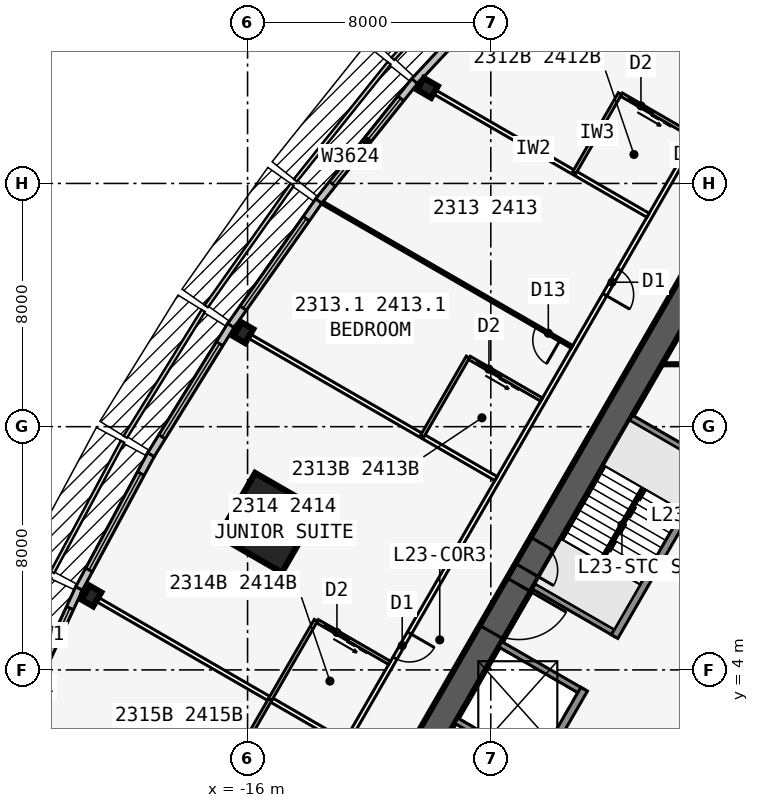
"""IFC4 building model, lengths in metres.
Left out: names, types, materials, properties, quantities, classifications, styles, units other than length and angle.
Written with IfcOpenShell. Run it as: python <this file> out.ifc"""

import sys

from ifc_helpers import new_model, si_unit, direction, frame, frame_2d, origin, origin_2d, place, context, subcontext, project, spatial, rectangle, i_section, extrude, element, fill, save


model = new_model("IFC4")
c1 = context("Model", 3, precision=1e-05, world=origin(), true_north=direction((0.0, 1.0)))
c2 = subcontext(c1, "Body", "Model", "MODEL_VIEW")
j1 = project(units=[si_unit("LENGTHUNIT", "METRE"), si_unit("PLANEANGLEUNIT", "RADIAN")], contexts=[c1])
p1 = place(None, origin())
s1 = spatial("IfcSite", under=j1, at=p1, CompositionType="ELEMENT")
p2 = place(p1, origin())
s2 = spatial("IfcBuilding", under=s1, at=p2, CompositionType="ELEMENT")
p3 = place(p2, frame((0.0, 0.0, 89.7)))
s3 = spatial("IfcBuildingStorey", under=s2, at=p3, CompositionType="ELEMENT", Elevation=89.7)
p4 = place(p3, frame((0.0, 19.052, 0.0), z_axis=(0.0, 0.0, 1.0), x_axis=(-0.499999749417, -0.866025548458, 0.0)))
e1 = element("IfcWall", 1, at=p4, inside=s3, PredefinedType="SHEAR", context=c2, shape_type="SweptSolid", body=[
    extrude(rectangle(XDim=33.0, YDim=0.9, at=frame_2d((16.5, 0.0))), origin(), (0.0, 0.0, 1.0), 3.4),
])
p5 = place(p4, frame((14.15, 0.0, 0.0)))
e2 = element("IfcOpeningElement", 2, at=p5, cuts=e1, PredefinedType="OPENING", context=c2, shape_type="SweptSolid", body=[
    extrude(rectangle(XDim=1.8, YDim=2.13, at=frame_2d((0.9, 1.065))), frame((0.0, 0.46, 0.0), z_axis=(0.0, -1.0, 0.0), x_axis=(1.0, 0.0, 0.0)), (0.0, 0.0, 1.0), 0.92),
])
p6 = place(p4, frame((12.6, 0.0, 0.0)))
e3 = element("IfcOpeningElement", 3, at=p6, cuts=e1, PredefinedType="OPENING", context=c2, shape_type="SweptSolid", body=[
    extrude(rectangle(XDim=1.0, YDim=2.13, at=frame_2d((0.5, 1.065))), frame((0.0, 0.46, 0.0), z_axis=(0.0, -1.0, 0.0), x_axis=(1.0, 0.0, 0.0)), (0.0, 0.0, 1.0), 0.92),
])
p7 = place(p3, frame((-0.062, 11.794, 0.0), z_axis=(0.0, 0.0, 1.0), x_axis=(-0.500006680225, -0.86602154692, 0.0)))
e4 = element("IfcWall", 4, at=p7, inside=s3, PredefinedType="SOLIDWALL", context=c2, shape_type="SweptSolid", body=[
    extrude(rectangle(XDim=7.733, YDim=0.25, at=frame_2d((3.866, 0.0))), origin(), (0.0, 0.0, 1.0), 3.235),
])
p8 = place(p3, frame((-4.929, 3.365, 0.0), z_axis=(0.0, 0.0, 1.0), x_axis=(-0.499991433582, -0.866030349552, 0.0)))
e5 = element("IfcWall", 5, at=p8, inside=s3, PredefinedType="SOLIDWALL", context=c2, shape_type="SweptSolid", body=[
    extrude(rectangle(XDim=10.633, YDim=0.25, at=frame_2d((5.316, 0.0))), origin(), (0.0, 0.0, 1.0), 3.235),
])
p9 = place(p8, frame((9.164, 0.0, 0.0)))
e6 = element("IfcOpeningElement", 6, at=p9, cuts=e5, PredefinedType="OPENING", context=c2, shape_type="SweptSolid", body=[
    extrude(rectangle(XDim=0.9, YDim=2.13, at=frame_2d((0.45, 1.065))), frame((0.0, 0.135, 0.0), z_axis=(0.0, -1.0, 0.0), x_axis=(1.0, 0.0, 0.0)), (0.0, 0.0, 1.0), 0.27),
])
for number, where, z_axis, x_axis in (
    (7, (-0.679, 10.727, 0.0), (0.0, 0.0, 1.0), (-0.866, 0.5, 0.0)),
    (8, (-3.879, 5.184, 0.0), (0.0, 0.0, 1.0), (-0.866, 0.5, 0.0)),
    (9, (-4.979, 3.279, 0.0), (0.0, 0.0, 1.0), (-0.866, 0.5, 0.0)),
    (10, (-6.429, 0.767, 0.0), (0.0, 0.0, 1.0), (-0.866, 0.5, 0.0)),
):
    element("IfcWall", number, at=place(p3, frame(where, z_axis=z_axis, x_axis=x_axis)), inside=s3, PredefinedType="SOLIDWALL", context=c2, shape_type="SweptSolid", body=[
        extrude(rectangle(XDim=3.125, YDim=0.2, at=frame_2d((1.562, 0.0))), origin(), (0.0, 0.0, 1.0), 3.235),
    ])
for number, where, z_axis, x_axis in (
    (11, (-10.083, 23.142, 0.0), (0.0, 0.0, 1.0), (-0.5, -0.866, 0.0)),
    (12, (-16.137, 15.09, 0.0), (0.0, 0.0, 1.0), (-0.866, 0.5, 0.0)),
    (13, (-21.137, 6.43, 0.0), (0.0, 0.0, 1.0), (-0.866, 0.5, 0.0)),
):
    element("IfcColumn", number, at=place(p3, frame(where, z_axis=z_axis, x_axis=x_axis)), inside=s3, PredefinedType="COLUMN", context=c2, shape_type="SweptSolid", body=[
        extrude(i_section(OverallWidth=0.442, OverallDepth=0.531, WebThickness=0.066, FlangeThickness=0.106, at=origin_2d()), origin(), (0.0, 0.0, 1.0), 3.4),
    ])
p10 = place(p3, frame((-15.312, 8.84, 0.0), z_axis=(0.0, 0.0, 1.0), x_axis=(-0.866025403784, 0.5, 0.0)))
e14 = element("IfcColumn", 14, at=p10, inside=s3, PredefinedType="COLUMN", context=c2, shape_type="SweptSolid", body=[
    extrude(rectangle(XDim=2.4, YDim=2.4, at=origin_2d()), origin(), (0.0, 0.0, 1.0), 3.4),
])
p11 = place(p3, frame((-4.909, 29.36, 0.0), z_axis=(0.0, 0.0, 1.0), x_axis=(-0.682289646561, -0.731081964075, 0.0)))
e15 = element("IfcWall", 15, at=p11, inside=s3, PredefinedType="STANDARD", context=c2, shape_type="SweptSolid", body=[
    extrude(rectangle(XDim=8.211, YDim=0.25, at=frame_2d((4.105, 0.0))), origin(), (0.0, 0.0, 1.0), 3.235),
])
p12 = place(p11, frame((2.006, 0.0, 0.45)))
e16 = element("IfcOpeningElement", 16, at=p12, cuts=e15, PredefinedType="OPENING", context=c2, shape_type="SweptSolid", body=[
    extrude(rectangle(XDim=4.2, YDim=2.4, at=frame_2d((2.1, 1.2))), frame((0.0, 0.135, 0.0), z_axis=(0.0, -1.0, 0.0), x_axis=(1.0, 0.0, 0.0)), (0.0, 0.0, 1.0), 0.27),
])
p13 = place(p3, frame((-10.505, 23.364, 0.0), z_axis=(0.0, 0.0, 1.0), x_axis=(-0.624594965756, -0.780948864364, 0.0)))
e17 = element("IfcWall", 17, at=p13, inside=s3, PredefinedType="STANDARD", context=c2, shape_type="SweptSolid", body=[
    extrude(rectangle(XDim=5.058, YDim=0.25, at=frame_2d((2.529, 0.0))), origin(), (0.0, 0.0, 1.0), 3.235),
])
p14 = place(p13, frame((0.729, 0.0, 0.45)))
e18 = element("IfcOpeningElement", 18, at=p14, cuts=e17, PredefinedType="OPENING", context=c2, shape_type="SweptSolid", body=[
    extrude(rectangle(XDim=3.6, YDim=2.4, at=frame_2d((1.8, 1.2))), frame((0.0, 0.135, 0.0), z_axis=(0.0, -1.0, 0.0), x_axis=(1.0, 0.0, 0.0)), (0.0, 0.0, 1.0), 0.27),
])
p15 = place(p3, frame((-13.659, 19.42, 0.0), z_axis=(0.0, 0.0, 1.0), x_axis=(-0.5766431066, -0.81699616132, 0.0)))
e19 = element("IfcWall", 19, at=p15, inside=s3, PredefinedType="STANDARD", context=c2, shape_type="SweptSolid", body=[
    extrude(rectangle(XDim=5.021, YDim=0.25, at=frame_2d((2.51, 0.0))), origin(), (0.0, 0.0, 1.0), 3.235),
])
p16 = place(p15, frame((0.71, 0.0, 0.45)))
e20 = element("IfcOpeningElement", 20, at=p16, cuts=e19, PredefinedType="OPENING", context=c2, shape_type="SweptSolid", body=[
    extrude(rectangle(XDim=3.6, YDim=2.4, at=frame_2d((1.8, 1.2))), frame((0.0, 0.135, 0.0), z_axis=(0.0, -1.0, 0.0), x_axis=(1.0, 0.0, 0.0)), (0.0, 0.0, 1.0), 0.27),
])
p17 = place(p3, frame((-16.551, 15.324, 0.0), z_axis=(0.0, 0.0, 1.0), x_axis=(-0.526132807704, -0.850402415717, 0.0)))
e21 = element("IfcWall", 21, at=p17, inside=s3, PredefinedType="STANDARD", context=c2, shape_type="SweptSolid", body=[
    extrude(rectangle(XDim=5.002, YDim=0.25, at=frame_2d((2.501, 0.0))), origin(), (0.0, 0.0, 1.0), 3.235),
])
p18 = place(p17, frame((0.701, 0.0, 0.45)))
e22 = element("IfcOpeningElement", 22, at=p18, cuts=e21, PredefinedType="OPENING", context=c2, shape_type="SweptSolid", body=[
    extrude(rectangle(XDim=3.6, YDim=2.4, at=frame_2d((1.8, 1.2))), frame((0.0, 0.135, 0.0), z_axis=(0.0, -1.0, 0.0), x_axis=(1.0, 0.0, 0.0)), (0.0, 0.0, 1.0), 0.27),
])
p19 = place(p3, frame((-19.178, 11.077, 0.0), z_axis=(0.0, 0.0, 1.0), x_axis=(-0.473412820489, -0.880840678782, 0.0)))
e23 = element("IfcWall", 23, at=p19, inside=s3, PredefinedType="STANDARD", context=c2, shape_type="SweptSolid", body=[
    extrude(rectangle(XDim=5.002, YDim=0.25, at=frame_2d((2.501, 0.0))), origin(), (0.0, 0.0, 1.0), 3.235),
])
p20 = place(p19, frame((0.701, 0.0, 0.45)))
e24 = element("IfcOpeningElement", 24, at=p20, cuts=e23, PredefinedType="OPENING", context=c2, shape_type="SweptSolid", body=[
    extrude(rectangle(XDim=3.6, YDim=2.4, at=frame_2d((1.8, 1.2))), frame((0.0, 0.135, 0.0), z_axis=(0.0, -1.0, 0.0), x_axis=(1.0, 0.0, 0.0)), (0.0, 0.0, 1.0), 0.27),
])
p21 = place(p3, frame((-21.543, 6.678, 0.0), z_axis=(0.0, 0.0, 1.0), x_axis=(-0.419203100754, -0.907892482796, 0.0)))
e25 = element("IfcWall", 25, at=p21, inside=s3, PredefinedType="STANDARD", context=c2, shape_type="SweptSolid", body=[
    extrude(rectangle(XDim=5.021, YDim=0.25, at=frame_2d((2.51, 0.0))), origin(), (0.0, 0.0, 1.0), 3.235),
])
p22 = place(p21, frame((0.71, 0.0, 0.45)))
e26 = element("IfcOpeningElement", 26, at=p22, cuts=e25, PredefinedType="OPENING", context=c2, shape_type="SweptSolid", body=[
    extrude(rectangle(XDim=3.6, YDim=2.4, at=frame_2d((1.8, 1.2))), frame((0.0, 0.135, 0.0), z_axis=(0.0, -1.0, 0.0), x_axis=(1.0, 0.0, 0.0)), (0.0, 0.0, 1.0), 0.27),
])
p23 = place(p3, frame((-0.5, 22.836, 0.0), z_axis=(0.0, 0.0, 1.0), x_axis=(-0.500001677587, -0.866024435227, 0.0)))
e27 = element("IfcWall", 27, at=p23, inside=s3, PredefinedType="PARTITIONING", context=c2, shape_type="SweptSolid", body=[
    extrude(rectangle(XDim=39.054, YDim=0.15, at=frame_2d((19.527, 0.0))), origin(), (0.0, 0.0, 1.0), 3.235),
])
p24 = place(p23, frame((0.352, 0.0, 0.0)))
e28 = element("IfcOpeningElement", 28, at=p24, cuts=e27, PredefinedType="OPENING", context=c2, shape_type="SweptSolid", body=[
    extrude(rectangle(XDim=0.95, YDim=2.13, at=frame_2d((0.475, 1.065))), frame((0.0, 0.085, 0.0), z_axis=(0.0, -1.0, 0.0), x_axis=(1.0, 0.0, 0.0)), (0.0, 0.0, 1.0), 0.17),
])
p25 = place(p23, frame((6.552, 0.0, 0.0)))
e29 = element("IfcOpeningElement", 29, at=p25, cuts=e27, PredefinedType="OPENING", context=c2, shape_type="SweptSolid", body=[
    extrude(rectangle(XDim=0.95, YDim=2.13, at=frame_2d((0.475, 1.065))), frame((0.0, 0.085, 0.0), z_axis=(0.0, -1.0, 0.0), x_axis=(1.0, 0.0, 0.0)), (0.0, 0.0, 1.0), 0.17),
])
p26 = place(p23, frame((20.352, 0.0, 0.0)))
e30 = element("IfcOpeningElement", 30, at=p26, cuts=e27, PredefinedType="OPENING", context=c2, shape_type="SweptSolid", body=[
    extrude(rectangle(XDim=0.95, YDim=2.13, at=frame_2d((0.475, 1.065))), frame((0.0, 0.085, 0.0), z_axis=(0.0, -1.0, 0.0), x_axis=(1.0, 0.0, 0.0)), (0.0, 0.0, 1.0), 0.17),
])
p27 = place(p23, frame((27.752, 0.0, 0.0)))
e31 = element("IfcOpeningElement", 31, at=p27, cuts=e27, PredefinedType="OPENING", context=c2, shape_type="SweptSolid", body=[
    extrude(rectangle(XDim=0.95, YDim=2.13, at=frame_2d((0.475, 1.065))), frame((0.0, 0.085, 0.0), z_axis=(0.0, -1.0, 0.0), x_axis=(1.0, 0.0, 0.0)), (0.0, 0.0, 1.0), 0.17),
])
p28 = place(p23, frame((37.752, 0.0, 0.0)))
e32 = element("IfcOpeningElement", 32, at=p28, cuts=e27, PredefinedType="OPENING", context=c2, shape_type="SweptSolid", body=[
    extrude(rectangle(XDim=0.95, YDim=2.13, at=frame_2d((0.475, 1.065))), frame((0.0, 0.085, 0.0), z_axis=(0.0, -1.0, 0.0), x_axis=(1.0, 0.0, 0.0)), (0.0, 0.0, 1.0), 0.17),
])
p29 = place(p3, frame((-2.829, 18.954, 0.0), z_axis=(0.0, 0.0, 1.0), x_axis=(-0.866020536561, 0.500008430184, 0.0)))
e33 = element("IfcWall", 33, at=p29, inside=s3, PredefinedType="PARTITIONING", context=c2, shape_type="SweptSolid", body=[
    extrude(rectangle(XDim=8.72, YDim=0.15, at=frame_2d((4.36, 0.0))), origin(), (0.0, 0.0, 1.0), 2.389),
])
p30 = place(p3, frame((-5.329, 14.623, 0.0), z_axis=(0.0, 0.0, 1.0), x_axis=(-0.866018409083, 0.500012114982, 0.0)))
e34 = element("IfcWall", 34, at=p30, inside=s3, PredefinedType="PARTITIONING", context=c2, shape_type="SweptSolid", body=[
    extrude(rectangle(XDim=9.485, YDim=0.1, at=frame_2d((4.742, 0.0))), origin(), (0.0, 0.0, 1.0), 2.389),
])
p31 = place(p30, frame((0.45, 0.0, 0.0)))
e35 = element("IfcOpeningElement", 35, at=p31, cuts=e34, PredefinedType="OPENING", context=c2, shape_type="SweptSolid", body=[
    extrude(rectangle(XDim=0.9, YDim=2.13, at=frame_2d((0.45, 1.065))), frame((0.0, 0.06, 0.0), z_axis=(0.0, -1.0, 0.0), x_axis=(1.0, 0.0, 0.0)), (0.0, 0.0, 1.0), 0.12),
])
p32 = place(p3, frame((-7.829, 10.293, 0.0), z_axis=(0.0, 0.0, 1.0), x_axis=(-0.866016302457, 0.50001576363, 0.0)))
e36 = element("IfcWall", 36, at=p32, inside=s3, PredefinedType="PARTITIONING", context=c2, shape_type="SweptSolid", body=[
    extrude(rectangle(XDim=9.943, YDim=0.15, at=frame_2d((4.972, 0.0))), origin(), (0.0, 0.0, 1.0), 2.389),
])
p33 = place(p3, frame((-12.829, 1.633, 0.0), z_axis=(0.0, 0.0, 1.0), x_axis=(-0.866026934769, 0.499997348248, 0.0)))
e37 = element("IfcWall", 37, at=p33, inside=s3, PredefinedType="PARTITIONING", context=c2, shape_type="SweptSolid", body=[
    extrude(rectangle(XDim=9.943, YDim=0.15, at=frame_2d((4.971, 0.0))), origin(), (0.0, 0.0, 1.0), 2.389),
])
p34 = place(p3, frame((-3.753, 22.952, 0.0), z_axis=(0.0, 0.0, 1.0), x_axis=(-0.499990139034, -0.866031096941, 0.0)))
e38 = element("IfcWall", 38, at=p34, inside=s3, PredefinedType="PLUMBINGWALL", context=c2, shape_type="SweptSolid", body=[
    extrude(rectangle(XDim=3.0, YDim=0.12, at=frame_2d((1.5, 0.0))), origin(), (0.0, 0.0, 1.0), 3.235),
])
p35 = place(p3, frame((-1.329, 21.552, 0.0), z_axis=(0.0, 0.0, 1.0), x_axis=(-0.865997131366, 0.500048966069, 0.0)))
e39 = element("IfcWall", 39, at=p35, inside=s3, PredefinedType="PLUMBINGWALL", context=c2, shape_type="SweptSolid", body=[
    extrude(rectangle(XDim=2.74, YDim=0.12, at=frame_2d((1.37, 0.0))), origin(), (0.0, 0.0, 1.0), 3.235),
])
p36 = place(p35, frame((1.55, 0.0, 0.0)))
e40 = element("IfcOpeningElement", 40, at=p36, cuts=e39, PredefinedType="OPENING", context=c2, shape_type="SweptSolid", body=[
    extrude(rectangle(XDim=0.9, YDim=2.13, at=frame_2d((0.45, 1.065))), frame((0.0, 0.07, 0.0), z_axis=(0.0, -1.0, 0.0), x_axis=(1.0, 0.0, 0.0)), (0.0, 0.0, 1.0), 0.14),
])
p37 = place(p3, frame((-8.753, 14.291, 0.0), z_axis=(0.0, 0.0, 1.0), x_axis=(-0.50002537861, -0.866010750942, 0.0)))
e41 = element("IfcWall", 41, at=p37, inside=s3, PredefinedType="PLUMBINGWALL", context=c2, shape_type="SweptSolid", body=[
    extrude(rectangle(XDim=3.0, YDim=0.12, at=frame_2d((1.5, 0.0))), origin(), (0.0, 0.0, 1.0), 3.235),
])
p38 = place(p3, frame((-6.329, 12.891, 0.0), z_axis=(0.0, 0.0, 1.0), x_axis=(-0.866035715982, 0.499982138324, 0.0)))
e42 = element("IfcWall", 42, at=p38, inside=s3, PredefinedType="PLUMBINGWALL", context=c2, shape_type="SweptSolid", body=[
    extrude(rectangle(XDim=2.74, YDim=0.12, at=frame_2d((1.37, 0.0))), origin(), (0.0, 0.0, 1.0), 3.235),
])
p39 = place(p38, frame((1.55, 0.0, 0.0)))
e43 = element("IfcOpeningElement", 43, at=p39, cuts=e42, PredefinedType="OPENING", context=c2, shape_type="SweptSolid", body=[
    extrude(rectangle(XDim=0.9, YDim=2.13, at=frame_2d((0.45, 1.065))), frame((0.0, 0.07, 0.0), z_axis=(0.0, -1.0, 0.0), x_axis=(1.0, 0.0, 0.0)), (0.0, 0.0, 1.0), 0.14),
])
p40 = place(p3, frame((-13.753, 5.631, 0.0), z_axis=(0.0, 0.0, 1.0), x_axis=(-0.499990139034, -0.866031096941, 0.0)))
e44 = element("IfcWall", 44, at=p40, inside=s3, PredefinedType="PLUMBINGWALL", context=c2, shape_type="SweptSolid", body=[
    extrude(rectangle(XDim=3.0, YDim=0.12, at=frame_2d((1.5, 0.0))), origin(), (0.0, 0.0, 1.0), 3.235),
])
p41 = place(p3, frame((-11.329, 4.231, 0.0), z_axis=(0.0, 0.0, 1.0), x_axis=(-0.866035715982, 0.499982138324, 0.0)))
e45 = element("IfcWall", 45, at=p41, inside=s3, PredefinedType="PLUMBINGWALL", context=c2, shape_type="SweptSolid", body=[
    extrude(rectangle(XDim=2.74, YDim=0.12, at=frame_2d((1.37, 0.0))), origin(), (0.0, 0.0, 1.0), 3.235),
])
p42 = place(p41, frame((1.55, 0.0, 0.0)))
e46 = element("IfcOpeningElement", 46, at=p42, cuts=e45, PredefinedType="OPENING", context=c2, shape_type="SweptSolid", body=[
    extrude(rectangle(XDim=0.9, YDim=2.13, at=frame_2d((0.45, 1.065))), frame((0.0, 0.07, 0.0), z_axis=(0.0, -1.0, 0.0), x_axis=(1.0, 0.0, 0.0)), (0.0, 0.0, 1.0), 0.14),
])
p43 = place(p3, frame((-15.253, 3.033, 0.0), z_axis=(0.0, 0.0, 1.0), x_axis=(-0.499990139034, -0.866031096941, 0.0)))
e47 = element("IfcWall", 47, at=p43, inside=s3, PredefinedType="PLUMBINGWALL", context=c2, shape_type="SweptSolid", body=[
    extrude(rectangle(XDim=3.0, YDim=0.12, at=frame_2d((1.5, 0.0))), origin(), (0.0, 0.0, 1.0), 3.235),
])
p44 = place(p3, frame((-2.367, 14.052, 0.0), z_axis=(0.0, 0.0, 1.0), x_axis=(1.0, 0.0, 0.0)))
e48 = element("IfcWall", 48, at=p44, inside=s3, PredefinedType="PARTITIONING", context=c2, shape_type="SweptSolid", body=[
    extrude(rectangle(XDim=4.734, YDim=0.1, at=frame_2d((2.367, 0.0))), origin(), (0.0, 0.0, 1.0), 3.235),
])
p45 = place(p44, frame((0.734, 0.0, 0.0)))
e49 = element("IfcOpeningElement", 49, at=p45, cuts=e48, PredefinedType="OPENING", context=c2, shape_type="SweptSolid", body=[
    extrude(rectangle(XDim=0.9, YDim=2.13, at=frame_2d((0.45, 1.065))), frame((0.0, 0.06, 0.0), z_axis=(0.0, -1.0, 0.0), x_axis=(1.0, 0.0, 0.0)), (0.0, 0.0, 1.0), 0.12),
])
p46 = place(p3, frame((-2.988, 9.978, 0.0), z_axis=(0.0, 0.0, 1.0), x_axis=(-0.499992232847, -0.866029888106, 0.0)))
e50 = element("IfcWall", 50, at=p46, inside=s3, PredefinedType="SOLIDWALL", context=c2, shape_type="SweptSolid", body=[
    extrude(rectangle(XDim=2.794, YDim=0.1, at=frame_2d((1.397, 0.0))), origin(), (0.0, 0.0, 1.0), 3.4),
])
p47 = place(p14, origin())
e51 = element("IfcWindow", 51, at=p47, inside=s3, PartitioningType="SINGLE_PANEL", PredefinedType="WINDOW", context=c2, shape_type="SweptSolid", body=[
    extrude(rectangle(XDim=3.6, YDim=2.4, at=frame_2d((1.8, 1.2))), frame((0.0, 0.03, 0.0), z_axis=(0.0, -1.0, 0.0), x_axis=(1.0, 0.0, 0.0)), (0.0, 0.0, 1.0), 0.06),
])
fill(e18, e51)
p48 = place(p16, origin())
e52 = element("IfcWindow", 52, at=p48, inside=s3, PartitioningType="SINGLE_PANEL", PredefinedType="WINDOW", context=c2, shape_type="SweptSolid", body=[
    extrude(rectangle(XDim=3.6, YDim=2.4, at=frame_2d((1.8, 1.2))), frame((0.0, 0.03, 0.0), z_axis=(0.0, -1.0, 0.0), x_axis=(1.0, 0.0, 0.0)), (0.0, 0.0, 1.0), 0.06),
])
fill(e20, e52)
p49 = place(p18, origin())
e53 = element("IfcWindow", 53, at=p49, inside=s3, PartitioningType="SINGLE_PANEL", PredefinedType="WINDOW", context=c2, shape_type="SweptSolid", body=[
    extrude(rectangle(XDim=3.6, YDim=2.4, at=frame_2d((1.8, 1.2))), frame((0.0, 0.03, 0.0), z_axis=(0.0, -1.0, 0.0), x_axis=(1.0, 0.0, 0.0)), (0.0, 0.0, 1.0), 0.06),
])
fill(e22, e53)
p50 = place(p20, origin())
e54 = element("IfcWindow", 54, at=p50, inside=s3, PartitioningType="SINGLE_PANEL", PredefinedType="WINDOW", context=c2, shape_type="SweptSolid", body=[
    extrude(rectangle(XDim=3.6, YDim=2.4, at=frame_2d((1.8, 1.2))), frame((0.0, 0.03, 0.0), z_axis=(0.0, -1.0, 0.0), x_axis=(1.0, 0.0, 0.0)), (0.0, 0.0, 1.0), 0.06),
])
fill(e24, e54)
p51 = place(p22, origin())
e55 = element("IfcWindow", 55, at=p51, inside=s3, PartitioningType="SINGLE_PANEL", PredefinedType="WINDOW", context=c2, shape_type="SweptSolid", body=[
    extrude(rectangle(XDim=3.6, YDim=2.4, at=frame_2d((1.8, 1.2))), frame((0.0, 0.03, 0.0), z_axis=(0.0, -1.0, 0.0), x_axis=(1.0, 0.0, 0.0)), (0.0, 0.0, 1.0), 0.06),
])
fill(e26, e55)
p52 = place(p31, origin())
e56 = element("IfcDoor", 56, at=p52, inside=s3, OperationType="SINGLE_SWING_LEFT", PredefinedType="DOOR", context=c2, shape_type="SweptSolid", body=[
    extrude(rectangle(XDim=0.9, YDim=2.13, at=frame_2d((0.45, 1.065))), frame((0.0, 0.025, 0.0), z_axis=(0.0, -1.0, 0.0), x_axis=(1.0, 0.0, 0.0)), (0.0, 0.0, 1.0), 0.05),
])
fill(e35, e56)
p53 = place(p36, origin())
e57 = element("IfcDoor", 57, at=p53, inside=s3, OperationType="SLIDING_TO_LEFT", PredefinedType="DOOR", context=c2, shape_type="SweptSolid", body=[
    extrude(rectangle(XDim=0.9, YDim=2.13, at=frame_2d((0.45, 1.065))), frame((0.0, 0.025, 0.0), z_axis=(0.0, -1.0, 0.0), x_axis=(1.0, 0.0, 0.0)), (0.0, 0.0, 1.0), 0.05),
])
fill(e40, e57)
p54 = place(p25, origin())
e58 = element("IfcDoor", 58, at=p54, inside=s3, OperationType="SINGLE_SWING_RIGHT", PredefinedType="DOOR", context=c2, shape_type="SweptSolid", body=[
    extrude(rectangle(XDim=0.95, YDim=2.13, at=frame_2d((0.475, 1.065))), frame((0.0, 0.025, 0.0), z_axis=(0.0, -1.0, 0.0), x_axis=(1.0, 0.0, 0.0)), (0.0, 0.0, 1.0), 0.05),
])
fill(e29, e58)
p55 = place(p39, origin())
e59 = element("IfcDoor", 59, at=p55, inside=s3, OperationType="SLIDING_TO_LEFT", PredefinedType="DOOR", context=c2, shape_type="SweptSolid", body=[
    extrude(rectangle(XDim=0.9, YDim=2.13, at=frame_2d((0.45, 1.065))), frame((0.0, 0.025, 0.0), z_axis=(0.0, -1.0, 0.0), x_axis=(1.0, 0.0, 0.0)), (0.0, 0.0, 1.0), 0.05),
])
fill(e43, e59)
p56 = place(p42, origin())
e60 = element("IfcDoor", 60, at=p56, inside=s3, OperationType="SLIDING_TO_LEFT", PredefinedType="DOOR", context=c2, shape_type="SweptSolid", body=[
    extrude(rectangle(XDim=0.9, YDim=2.13, at=frame_2d((0.45, 1.065))), frame((0.0, 0.025, 0.0), z_axis=(0.0, -1.0, 0.0), x_axis=(1.0, 0.0, 0.0)), (0.0, 0.0, 1.0), 0.05),
])
fill(e46, e60)
p57 = place(p26, origin())
e61 = element("IfcDoor", 61, at=p57, inside=s3, OperationType="SINGLE_SWING_LEFT", PredefinedType="DOOR", context=c2, shape_type="SweptSolid", body=[
    extrude(rectangle(XDim=0.95, YDim=2.13, at=frame_2d((0.475, 1.065))), frame((0.0, 0.025, 0.0), z_axis=(0.0, -1.0, 0.0), x_axis=(1.0, 0.0, 0.0)), (0.0, 0.0, 1.0), 0.05),
])
fill(e30, e61)
p58 = place(p5, origin())
e62 = element("IfcDoor", 62, at=p58, inside=s3, OperationType="DOUBLE_DOOR_SINGLE_SWING", PredefinedType="DOOR", context=c2, shape_type="SweptSolid", body=[
    extrude(rectangle(XDim=1.8, YDim=2.13, at=frame_2d((0.9, 1.065))), frame((0.0, 0.025, 0.0), z_axis=(0.0, -1.0, 0.0), x_axis=(1.0, 0.0, 0.0)), (0.0, 0.0, 1.0), 0.05),
])
fill(e2, e62)
p59 = place(p6, origin())
e63 = element("IfcDoor", 63, at=p59, inside=s3, OperationType="SINGLE_SWING_RIGHT", PredefinedType="DOOR", context=c2, shape_type="SweptSolid", body=[
    extrude(rectangle(XDim=1.0, YDim=2.13, at=frame_2d((0.5, 1.065))), frame((0.0, 0.025, 0.0), z_axis=(0.0, -1.0, 0.0), x_axis=(1.0, 0.0, 0.0)), (0.0, 0.0, 1.0), 0.05),
])
fill(e3, e63)
save(model, sys.argv[1])
